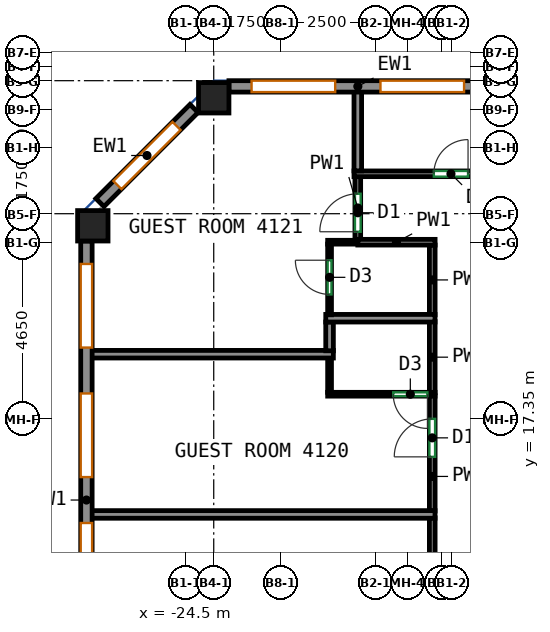
"""IFC4 building model, lengths in metres.
Left out: names, types, materials, properties, quantities, classifications, styles, units other than length and angle.
Written with IfcOpenShell. Run it as: python <this file> out.ifc"""

import sys

from ifc_helpers import new_model, si_unit, direction, frame, frame_2d, origin, origin_2d, place, context, subcontext, project, spatial, rectangle, extrude, source, transform, mapped, element, fill, save


model = new_model("IFC4")
c1 = context("Model", 3, precision=1e-05, world=origin(), true_north=direction((0.0, 1.0)))
c2 = subcontext(c1, "Body", "Model", "MODEL_VIEW")
j1 = project(units=[si_unit("LENGTHUNIT", "METRE"), si_unit("PLANEANGLEUNIT", "RADIAN")], contexts=[c1])
p1 = place(None, origin())
s1 = spatial("IfcSite", under=j1, at=p1, CompositionType="ELEMENT")
p2 = place(p1, origin())
s2 = spatial("IfcBuilding", under=s1, at=p2, CompositionType="ELEMENT")
p3 = place(p2, frame((0.0, 0.0, 175.3)))
s3 = spatial("IfcBuildingStorey", under=s2, at=p3, CompositionType="ELEMENT", Elevation=175.3)
m1 = source(origin(), c2, "Body", "SweptSolid", [
    extrude(rectangle(XDim=0.8, YDim=0.8, at=origin_2d()), origin(), (0.0, 0.0, 1.0), 3.12),
])
for number, where, z_axis, x_axis in (
    (1, (-26.932, 22.432, 0.0), (0.0, 0.0, 1.0), (1.0, 0.0, 0.0)),
    (2, (-23.75, 25.8, 0.0), (0.0, 0.0, 1.0), (1.0, 0.0, 0.0)),
):
    element("IfcColumn", number, at=place(p3, frame(where, z_axis=z_axis, x_axis=x_axis)), inside=s3, PredefinedType="COLUMN", context=c2, shape_type="MappedRepresentation", body=[
        mapped(m1, transform((0.0, 0.0, 0.0))),
    ])
m2 = source(origin(), c2, "Body", "SweptSolid", [
    extrude(rectangle(XDim=6.783, YDim=0.3, at=frame_2d((3.392, 0.0))), origin(), (0.0, 0.0, 1.0), 3.12),
])
p4 = place(p3, frame((-16.567, 26.1, 0.0), z_axis=(0.0, 0.0, 1.0), x_axis=(-1.0, 0.0, 0.0)))
e3 = element("IfcWall", 3, at=p4, inside=s3, PredefinedType="SOLIDWALL", context=c2, shape_type="MappedRepresentation", body=[
    mapped(m2, transform((0.0, 0.0, 0.0))),
])
p5 = place(p4, frame((0.596, 0.0, 0.85)))
e4 = element("IfcOpeningElement", 4, at=p5, cuts=e3, PredefinedType="OPENING", context=c2, shape_type="SweptSolid", body=[
    extrude(rectangle(XDim=2.2, YDim=1.95, at=frame_2d((1.1, 0.975))), frame((0.0, 0.16, 0.0), z_axis=(0.0, -1.0, 0.0), x_axis=(1.0, 0.0, 0.0)), (0.0, 0.0, 1.0), 0.32),
])
p6 = place(p4, frame((3.988, 0.0, 0.85)))
e5 = element("IfcOpeningElement", 5, at=p6, cuts=e3, PredefinedType="OPENING", context=c2, shape_type="SweptSolid", body=[
    extrude(rectangle(XDim=2.2, YDim=1.95, at=frame_2d((1.1, 0.975))), frame((0.0, 0.16, 0.0), z_axis=(0.0, -1.0, 0.0), x_axis=(1.0, 0.0, 0.0)), (0.0, 0.0, 1.0), 0.32),
])
m3 = source(origin(), c2, "Body", "SweptSolid", [
    extrude(rectangle(XDim=3.5, YDim=0.3, at=frame_2d((1.75, 0.0))), origin(), (0.0, 0.0, 1.0), 3.12),
])
p7 = place(p3, frame((-24.269, 25.519, 0.0), z_axis=(0.0, 0.0, 1.0), x_axis=(-0.707141656123, -0.70707190453, 0.0)))
e6 = element("IfcWall", 6, at=p7, inside=s3, PredefinedType="SOLIDWALL", context=c2, shape_type="MappedRepresentation", body=[
    mapped(m3, transform((0.0, 0.0, 0.0))),
])
p8 = place(p7, frame((0.65, 0.0, 0.85)))
e7 = element("IfcOpeningElement", 7, at=p8, cuts=e6, PredefinedType="OPENING", context=c2, shape_type="SweptSolid", body=[
    extrude(rectangle(XDim=2.2, YDim=1.95, at=frame_2d((1.1, 0.975))), frame((0.0, 0.16, 0.0), z_axis=(0.0, -1.0, 0.0), x_axis=(1.0, 0.0, 0.0)), (0.0, 0.0, 1.0), 0.32),
])
m4 = source(origin(), c2, "Body", "SweptSolid", [
    extrude(rectangle(XDim=13.632, YDim=0.3, at=frame_2d((6.816, 0.0))), origin(), (0.0, 0.0, 1.0), 3.12),
])
p9 = place(p3, frame((-27.1, 22.032, 0.0), z_axis=(0.0, 0.0, 1.0), x_axis=(0.0, -1.0, 0.0)))
e8 = element("IfcWall", 8, at=p9, inside=s3, PredefinedType="SOLIDWALL", context=c2, shape_type="MappedRepresentation", body=[
    mapped(m4, transform((0.0, 0.0, 0.0))),
])
p10 = place(p9, frame((0.604, 0.0, 0.85)))
e9 = element("IfcOpeningElement", 9, at=p10, cuts=e8, PredefinedType="OPENING", context=c2, shape_type="SweptSolid", body=[
    extrude(rectangle(XDim=2.2, YDim=1.95, at=frame_2d((1.1, 0.975))), frame((0.0, 0.16, 0.0), z_axis=(0.0, -1.0, 0.0), x_axis=(1.0, 0.0, 0.0)), (0.0, 0.0, 1.0), 0.32),
])
p11 = place(p9, frame((4.012, 0.0, 0.85)))
e10 = element("IfcOpeningElement", 10, at=p11, cuts=e8, PredefinedType="OPENING", context=c2, shape_type="SweptSolid", body=[
    extrude(rectangle(XDim=2.2, YDim=1.95, at=frame_2d((1.1, 0.975))), frame((0.0, 0.16, 0.0), z_axis=(0.0, -1.0, 0.0), x_axis=(1.0, 0.0, 0.0)), (0.0, 0.0, 1.0), 0.32),
])
p12 = place(p9, frame((7.42, 0.0, 0.85)))
e11 = element("IfcOpeningElement", 11, at=p12, cuts=e8, PredefinedType="OPENING", context=c2, shape_type="SweptSolid", body=[
    extrude(rectangle(XDim=2.2, YDim=1.95, at=frame_2d((1.1, 0.975))), frame((0.0, 0.16, 0.0), z_axis=(0.0, -1.0, 0.0), x_axis=(1.0, 0.0, 0.0)), (0.0, 0.0, 1.0), 0.32),
])
p13 = place(p9, frame((10.828, 0.0, 0.85)))
e12 = element("IfcOpeningElement", 12, at=p13, cuts=e8, PredefinedType="OPENING", context=c2, shape_type="SweptSolid", body=[
    extrude(rectangle(XDim=2.2, YDim=1.95, at=frame_2d((1.1, 0.975))), frame((0.0, 0.16, 0.0), z_axis=(0.0, -1.0, 0.0), x_axis=(1.0, 0.0, 0.0)), (0.0, 0.0, 1.0), 0.32),
])
p14 = place(p3, frame((-18.0, 10.04, 0.0), z_axis=(0.0, 0.0, 1.0), x_axis=(0.0, 1.0, 0.0)))
e13 = element("IfcWall", 13, at=p14, inside=s3, PredefinedType="PARTITIONING", context=c2, shape_type="SweptSolid", body=[
    extrude(rectangle(XDim=4.707, YDim=0.15, at=frame_2d((2.354, 0.0))), origin(), (0.0, 0.0, 1.0), 3.12),
])
p15 = place(p14, frame((0.501, 0.0, 0.0)))
e14 = element("IfcOpeningElement", 14, at=p15, cuts=e13, PredefinedType="OPENING", context=c2, shape_type="SweptSolid", body=[
    extrude(rectangle(XDim=1.0, YDim=2.1, at=frame_2d((0.5, 1.05))), frame((0.0, 0.085, 0.0), z_axis=(0.0, -1.0, 0.0), x_axis=(1.0, 0.0, 0.0)), (0.0, 0.0, 1.0), 0.17),
])
p16 = place(p3, frame((-18.0, 14.927, 0.0), z_axis=(0.0, 0.0, 1.0), x_axis=(0.0, 1.0, 0.0)))
e15 = element("IfcWall", 15, at=p16, inside=s3, PredefinedType="PARTITIONING", context=c2, shape_type="SweptSolid", body=[
    extrude(rectangle(XDim=3.033, YDim=0.15, at=frame_2d((1.517, 0.0))), origin(), (0.0, 0.0, 1.0), 3.12),
])
p17 = place(p16, frame((1.425, 0.0, 0.0)))
e16 = element("IfcOpeningElement", 16, at=p17, cuts=e15, PredefinedType="OPENING", context=c2, shape_type="SweptSolid", body=[
    extrude(rectangle(XDim=1.0, YDim=2.1, at=frame_2d((0.5, 1.05))), frame((0.0, 0.085, 0.0), z_axis=(0.0, -1.0, 0.0), x_axis=(1.0, 0.0, 0.0)), (0.0, 0.0, 1.0), 0.17),
])
p18 = place(p3, frame((-18.0, 18.04, 0.0), z_axis=(0.0, 0.0, 1.0), x_axis=(0.0, 1.0, 0.0)))
e17 = element("IfcWall", 17, at=p18, inside=s3, PredefinedType="PARTITIONING", context=c2, shape_type="SweptSolid", body=[
    extrude(rectangle(XDim=1.87, YDim=0.15, at=frame_2d((0.935, 0.0))), origin(), (0.0, 0.0, 1.0), 3.12),
])
p19 = place(p3, frame((-19.959, 22.075, 0.0), z_axis=(0.0, 0.0, 1.0), x_axis=(0.0, 1.0, 0.0)))
e18 = element("IfcWall", 18, at=p19, inside=s3, PredefinedType="PARTITIONING", context=c2, shape_type="SweptSolid", body=[
    extrude(rectangle(XDim=1.65, YDim=0.15, at=frame_2d((0.825, 0.0))), origin(), (0.0, 0.0, 1.0), 3.12),
])
p20 = place(p19, frame((0.2, 0.0, 0.0)))
e19 = element("IfcOpeningElement", 19, at=p20, cuts=e18, PredefinedType="OPENING", context=c2, shape_type="SweptSolid", body=[
    extrude(rectangle(XDim=1.0, YDim=2.1, at=frame_2d((0.5, 1.05))), frame((0.0, 0.085, 0.0), z_axis=(0.0, -1.0, 0.0), x_axis=(1.0, 0.0, 0.0)), (0.0, 0.0, 1.0), 0.17),
])
p21 = place(p3, frame((-18.0, 20.09, 0.0), z_axis=(0.0, 0.0, 1.0), x_axis=(0.0, 1.0, 0.0)))
e20 = element("IfcWall", 20, at=p21, inside=s3, PredefinedType="PARTITIONING", context=c2, shape_type="SweptSolid", body=[
    extrude(rectangle(XDim=1.835, YDim=0.15, at=frame_2d((0.917, 0.0))), origin(), (0.0, 0.0, 1.0), 3.12),
])
p22 = place(p3, frame((-19.959, 22.0, 0.0), z_axis=(0.0, 0.0, 1.0), x_axis=(1.0, 0.0, 0.0)))
e21 = element("IfcWall", 21, at=p22, inside=s3, PredefinedType="PARTITIONING", context=c2, shape_type="SweptSolid", body=[
    extrude(rectangle(XDim=2.034, YDim=0.15, at=frame_2d((1.017, 0.0))), origin(), (0.0, 0.0, 1.0), 3.12),
])
p23 = place(p3, frame((-20.059, 23.8, 0.0), z_axis=(0.0, 0.0, 1.0), x_axis=(1.0, 0.0, 0.0)))
e22 = element("IfcWall", 22, at=p23, inside=s3, PredefinedType="PARTITIONING", context=c2, shape_type="SweptSolid", body=[
    extrude(rectangle(XDim=41.909, YDim=0.15, at=frame_2d((20.955, 0.0))), origin(), (0.0, 0.0, 1.0), 3.12),
])
p24 = place(p23, frame((2.101, 0.0, 0.0)))
e23 = element("IfcOpeningElement", 23, at=p24, cuts=e22, PredefinedType="OPENING", context=c2, shape_type="SweptSolid", body=[
    extrude(rectangle(XDim=0.9, YDim=2.1, at=frame_2d((0.45, 1.05))), frame((0.0, 0.085, 0.0), z_axis=(0.0, -1.0, 0.0), x_axis=(1.0, 0.0, 0.0)), (0.0, 0.0, 1.0), 0.17),
])
p25 = place(p23, frame((4.585, 0.0, 0.0)))
e24 = element("IfcOpeningElement", 24, at=p25, cuts=e22, PredefinedType="OPENING", context=c2, shape_type="SweptSolid", body=[
    extrude(rectangle(XDim=1.0, YDim=2.1, at=frame_2d((0.5, 1.05))), frame((0.0, 0.085, 0.0), z_axis=(0.0, -1.0, 0.0), x_axis=(1.0, 0.0, 0.0)), (0.0, 0.0, 1.0), 0.17),
])
p26 = place(p23, frame((8.175, 0.0, 0.0)))
e25 = element("IfcOpeningElement", 25, at=p26, cuts=e22, PredefinedType="OPENING", context=c2, shape_type="SweptSolid", body=[
    extrude(rectangle(XDim=0.9, YDim=2.1, at=frame_2d((0.45, 1.05))), frame((0.0, 0.085, 0.0), z_axis=(0.0, -1.0, 0.0), x_axis=(1.0, 0.0, 0.0)), (0.0, 0.0, 1.0), 0.17),
])
p27 = place(p23, frame((13.173, 0.0, 0.0)))
e26 = element("IfcOpeningElement", 26, at=p27, cuts=e22, PredefinedType="OPENING", context=c2, shape_type="SweptSolid", body=[
    extrude(rectangle(XDim=1.0, YDim=2.1, at=frame_2d((0.5, 1.05))), frame((0.0, 0.085, 0.0), z_axis=(0.0, -1.0, 0.0), x_axis=(1.0, 0.0, 0.0)), (0.0, 0.0, 1.0), 0.17),
])
p28 = place(p23, frame((15.658, 0.0, 0.0)))
e27 = element("IfcOpeningElement", 27, at=p28, cuts=e22, PredefinedType="OPENING", context=c2, shape_type="SweptSolid", body=[
    extrude(rectangle(XDim=0.9, YDim=2.1, at=frame_2d((0.45, 1.05))), frame((0.0, 0.085, 0.0), z_axis=(0.0, -1.0, 0.0), x_axis=(1.0, 0.0, 0.0)), (0.0, 0.0, 1.0), 0.17),
])
p29 = place(p23, frame((21.315, 0.0, 0.0)))
e28 = element("IfcOpeningElement", 28, at=p29, cuts=e22, PredefinedType="OPENING", context=c2, shape_type="SweptSolid", body=[
    extrude(rectangle(XDim=0.9, YDim=2.1, at=frame_2d((0.45, 1.05))), frame((0.0, 0.085, 0.0), z_axis=(0.0, -1.0, 0.0), x_axis=(1.0, 0.0, 0.0)), (0.0, 0.0, 1.0), 0.17),
])
p30 = place(p23, frame((24.625, 0.0, 0.0)))
e29 = element("IfcOpeningElement", 29, at=p30, cuts=e22, PredefinedType="OPENING", context=c2, shape_type="SweptSolid", body=[
    extrude(rectangle(XDim=1.0, YDim=2.1, at=frame_2d((0.5, 1.05))), frame((0.0, 0.085, 0.0), z_axis=(0.0, -1.0, 0.0), x_axis=(1.0, 0.0, 0.0)), (0.0, 0.0, 1.0), 0.17),
])
p31 = place(p23, frame((29.043, 0.0, 0.0)))
e30 = element("IfcOpeningElement", 30, at=p31, cuts=e22, PredefinedType="OPENING", context=c2, shape_type="SweptSolid", body=[
    extrude(rectangle(XDim=0.9, YDim=2.1, at=frame_2d((0.45, 1.05))), frame((0.0, 0.085, 0.0), z_axis=(0.0, -1.0, 0.0), x_axis=(1.0, 0.0, 0.0)), (0.0, 0.0, 1.0), 0.17),
])
p32 = place(p23, frame((32.735, 0.0, 0.0)))
e31 = element("IfcOpeningElement", 31, at=p32, cuts=e22, PredefinedType="OPENING", context=c2, shape_type="SweptSolid", body=[
    extrude(rectangle(XDim=1.0, YDim=2.1, at=frame_2d((0.5, 1.05))), frame((0.0, 0.085, 0.0), z_axis=(0.0, -1.0, 0.0), x_axis=(1.0, 0.0, 0.0)), (0.0, 0.0, 1.0), 0.17),
])
p33 = place(p23, frame((36.627, 0.0, 0.0)))
e32 = element("IfcOpeningElement", 32, at=p33, cuts=e22, PredefinedType="OPENING", context=c2, shape_type="SweptSolid", body=[
    extrude(rectangle(XDim=0.9, YDim=2.1, at=frame_2d((0.45, 1.05))), frame((0.0, 0.085, 0.0), z_axis=(0.0, -1.0, 0.0), x_axis=(1.0, 0.0, 0.0)), (0.0, 0.0, 1.0), 0.17),
])
p34 = place(p23, frame((38.808, 0.0, 0.0)))
e33 = element("IfcOpeningElement", 33, at=p34, cuts=e22, PredefinedType="OPENING", context=c2, shape_type="SweptSolid", body=[
    extrude(rectangle(XDim=0.9, YDim=2.1, at=frame_2d((0.45, 1.05))), frame((0.0, 0.085, 0.0), z_axis=(0.0, -1.0, 0.0), x_axis=(1.0, 0.0, 0.0)), (0.0, 0.0, 1.0), 0.17),
])
p35 = place(p3, frame((-17.927, 14.837, 0.0), z_axis=(0.0, 0.0, 1.0), x_axis=(-1.0, 0.0, 0.0)))
e34 = element("IfcWall", 34, at=p35, inside=s3, PredefinedType="PARTITIONING", context=c2, shape_type="SweptSolid", body=[
    extrude(rectangle(XDim=9.073, YDim=0.2, at=frame_2d((4.537, 0.0))), origin(), (0.0, 0.0, 1.0), 3.12),
])
p36 = place(p3, frame((-17.927, 18.0, 0.0), z_axis=(0.0, 0.0, 1.0), x_axis=(-1.0, 0.0, 0.0)))
e35 = element("IfcWall", 35, at=p36, inside=s3, PredefinedType="PARTITIONING", context=c2, shape_type="SweptSolid", body=[
    extrude(rectangle(XDim=2.825, YDim=0.1, at=frame_2d((1.413, 0.0))), origin(), (0.0, 0.0, 1.0), 3.12),
])
p37 = place(p36, frame((0.2, 0.0, 0.0)))
e36 = element("IfcOpeningElement", 36, at=p37, cuts=e35, PredefinedType="OPENING", context=c2, shape_type="SweptSolid", body=[
    extrude(rectangle(XDim=0.9, YDim=2.1, at=frame_2d((0.45, 1.05))), frame((0.0, 0.06, 0.0), z_axis=(0.0, -1.0, 0.0), x_axis=(1.0, 0.0, 0.0)), (0.0, 0.0, 1.0), 0.12),
])
p38 = place(p3, frame((-20.702, 18.05, 0.0), z_axis=(0.0, 0.0, 1.0), x_axis=(0.0, 1.0, 0.0)))
e37 = element("IfcWall", 37, at=p38, inside=s3, PredefinedType="PARTITIONING", context=c2, shape_type="SweptSolid", body=[
    extrude(rectangle(XDim=0.903, YDim=0.1, at=frame_2d((0.451, 0.0))), origin(), (0.0, 0.0, 1.0), 3.12),
])
p39 = place(p3, frame((-20.602, 19.053, 0.0), z_axis=(0.0, 0.0, 1.0), x_axis=(-1.0, 0.0, 0.0)))
e38 = element("IfcWall", 38, at=p39, inside=s3, PredefinedType="PARTITIONING", context=c2, shape_type="SweptSolid", body=[
    extrude(rectangle(XDim=6.398, YDim=0.2, at=frame_2d((3.199, 0.0))), origin(), (0.0, 0.0, 1.0), 3.12),
])
p40 = place(p3, frame((-20.702, 19.9, 0.0), z_axis=(0.0, 0.0, 1.0), x_axis=(0.0, -1.0, 0.0)))
e39 = element("IfcWall", 39, at=p40, inside=s3, PredefinedType="PARTITIONING", context=c2, shape_type="SweptSolid", body=[
    extrude(rectangle(XDim=0.757, YDim=0.2, at=frame_2d((0.378, 0.0))), origin(), (0.0, 0.0, 1.0), 3.12),
])
p41 = place(p3, frame((-17.927, 20.0, 0.0), z_axis=(0.0, 0.0, 1.0), x_axis=(-1.0, 0.0, 0.0)))
e40 = element("IfcWall", 40, at=p41, inside=s3, PredefinedType="PARTITIONING", context=c2, shape_type="SweptSolid", body=[
    extrude(rectangle(XDim=2.875, YDim=0.2, at=frame_2d((1.438, 0.0))), origin(), (0.0, 0.0, 1.0), 3.12),
])
p42 = place(p3, frame((-20.752, 22.0, 0.0), z_axis=(0.0, 0.0, 1.0), x_axis=(1.0, 0.0, 0.0)))
e41 = element("IfcWall", 41, at=p42, inside=s3, PredefinedType="PARTITIONING", context=c2, shape_type="SweptSolid", body=[
    extrude(rectangle(XDim=0.791, YDim=0.1, at=frame_2d((0.396, 0.0))), origin(), (0.0, 0.0, 1.0), 3.12),
])
p43 = place(p3, frame((-20.702, 20.09, 0.0), z_axis=(0.0, 0.0, 1.0), x_axis=(0.0, 1.0, 0.0)))
e42 = element("IfcWall", 42, at=p43, inside=s3, PredefinedType="PARTITIONING", context=c2, shape_type="SweptSolid", body=[
    extrude(rectangle(XDim=1.86, YDim=0.1, at=frame_2d((0.93, 0.0))), origin(), (0.0, 0.0, 1.0), 3.12),
])
p44 = place(p43, frame((0.536, 0.0, 0.0)))
e43 = element("IfcOpeningElement", 43, at=p44, cuts=e42, PredefinedType="OPENING", context=c2, shape_type="SweptSolid", body=[
    extrude(rectangle(XDim=0.9, YDim=2.1, at=frame_2d((0.45, 1.05))), frame((0.0, 0.06, 0.0), z_axis=(0.0, -1.0, 0.0), x_axis=(1.0, 0.0, 0.0)), (0.0, 0.0, 1.0), 0.12),
])
p45 = place(p3, frame((-19.959, 23.877, 0.0), z_axis=(0.0, 0.0, 1.0), x_axis=(0.0, 1.0, 0.0)))
e44 = element("IfcWall", 44, at=p45, inside=s3, PredefinedType="PARTITIONING", context=c2, shape_type="SweptSolid", body=[
    extrude(rectangle(XDim=2.123, YDim=0.2, at=frame_2d((1.062, 0.0))), origin(), (0.0, 0.0, 1.0), 3.12),
])
p46 = place(p5, origin())
e45 = element("IfcWindow", 45, at=p46, inside=s3, PartitioningType="SINGLE_PANEL", PredefinedType="WINDOW", context=c2, shape_type="SweptSolid", body=[
    extrude(rectangle(XDim=2.2, YDim=1.95, at=frame_2d((1.1, 0.975))), frame((0.0, 0.03, 0.0), z_axis=(0.0, -1.0, 0.0), x_axis=(1.0, 0.0, 0.0)), (0.0, 0.0, 1.0), 0.06),
])
fill(e4, e45)
p47 = place(p6, origin())
e46 = element("IfcWindow", 46, at=p47, inside=s3, PartitioningType="SINGLE_PANEL", PredefinedType="WINDOW", context=c2, shape_type="SweptSolid", body=[
    extrude(rectangle(XDim=2.2, YDim=1.95, at=frame_2d((1.1, 0.975))), frame((0.0, 0.03, 0.0), z_axis=(0.0, -1.0, 0.0), x_axis=(1.0, 0.0, 0.0)), (0.0, 0.0, 1.0), 0.06),
])
fill(e5, e46)
p48 = place(p8, origin())
e47 = element("IfcWindow", 47, at=p48, inside=s3, PartitioningType="SINGLE_PANEL", PredefinedType="WINDOW", context=c2, shape_type="SweptSolid", body=[
    extrude(rectangle(XDim=2.2, YDim=1.95, at=frame_2d((1.1, 0.975))), frame((0.0, 0.03, 0.0), z_axis=(0.0, -1.0, 0.0), x_axis=(1.0, 0.0, 0.0)), (0.0, 0.0, 1.0), 0.06),
])
fill(e7, e47)
p49 = place(p10, origin())
e48 = element("IfcWindow", 48, at=p49, inside=s3, PartitioningType="SINGLE_PANEL", PredefinedType="WINDOW", context=c2, shape_type="SweptSolid", body=[
    extrude(rectangle(XDim=2.2, YDim=1.95, at=frame_2d((1.1, 0.975))), frame((0.0, 0.03, 0.0), z_axis=(0.0, -1.0, 0.0), x_axis=(1.0, 0.0, 0.0)), (0.0, 0.0, 1.0), 0.06),
])
fill(e9, e48)
p50 = place(p11, origin())
e49 = element("IfcWindow", 49, at=p50, inside=s3, PartitioningType="SINGLE_PANEL", PredefinedType="WINDOW", context=c2, shape_type="SweptSolid", body=[
    extrude(rectangle(XDim=2.2, YDim=1.95, at=frame_2d((1.1, 0.975))), frame((0.0, 0.03, 0.0), z_axis=(0.0, -1.0, 0.0), x_axis=(1.0, 0.0, 0.0)), (0.0, 0.0, 1.0), 0.06),
])
fill(e10, e49)
p51 = place(p12, origin())
e50 = element("IfcWindow", 50, at=p51, inside=s3, PartitioningType="SINGLE_PANEL", PredefinedType="WINDOW", context=c2, shape_type="SweptSolid", body=[
    extrude(rectangle(XDim=2.2, YDim=1.95, at=frame_2d((1.1, 0.975))), frame((0.0, 0.03, 0.0), z_axis=(0.0, -1.0, 0.0), x_axis=(1.0, 0.0, 0.0)), (0.0, 0.0, 1.0), 0.06),
])
fill(e11, e50)
p52 = place(p17, origin())
e51 = element("IfcDoor", 51, at=p52, inside=s3, OperationType="SINGLE_SWING_LEFT", PredefinedType="DOOR", context=c2, shape_type="SweptSolid", body=[
    extrude(rectangle(XDim=1.0, YDim=2.1, at=frame_2d((0.5, 1.05))), frame((0.0, 0.025, 0.0), z_axis=(0.0, -1.0, 0.0), x_axis=(1.0, 0.0, 0.0)), (0.0, 0.0, 1.0), 0.05),
])
fill(e16, e51)
p53 = place(p37, origin())
e52 = element("IfcDoor", 52, at=p53, inside=s3, OperationType="SINGLE_SWING_LEFT", PredefinedType="DOOR", context=c2, shape_type="SweptSolid", body=[
    extrude(rectangle(XDim=0.9, YDim=2.1, at=frame_2d((0.45, 1.05))), frame((0.0, 0.025, 0.0), z_axis=(0.0, -1.0, 0.0), x_axis=(1.0, 0.0, 0.0)), (0.0, 0.0, 1.0), 0.05),
])
fill(e36, e52)
p54 = place(p44, origin())
e53 = element("IfcDoor", 53, at=p54, inside=s3, OperationType="SINGLE_SWING_RIGHT", PredefinedType="DOOR", context=c2, shape_type="SweptSolid", body=[
    extrude(rectangle(XDim=0.9, YDim=2.1, at=frame_2d((0.45, 1.05))), frame((0.0, 0.025, 0.0), z_axis=(0.0, -1.0, 0.0), x_axis=(1.0, 0.0, 0.0)), (0.0, 0.0, 1.0), 0.05),
])
fill(e43, e53)
p55 = place(p20, origin())
e54 = element("IfcDoor", 54, at=p55, inside=s3, OperationType="SINGLE_SWING_LEFT", PredefinedType="DOOR", context=c2, shape_type="SweptSolid", body=[
    extrude(rectangle(XDim=1.0, YDim=2.1, at=frame_2d((0.5, 1.05))), frame((0.0, 0.025, 0.0), z_axis=(0.0, -1.0, 0.0), x_axis=(1.0, 0.0, 0.0)), (0.0, 0.0, 1.0), 0.05),
])
fill(e19, e54)
p56 = place(p24, origin())
e55 = element("IfcDoor", 55, at=p56, inside=s3, OperationType="SINGLE_SWING_RIGHT", PredefinedType="DOOR", context=c2, shape_type="SweptSolid", body=[
    extrude(rectangle(XDim=0.9, YDim=2.1, at=frame_2d((0.45, 1.05))), frame((0.0, 0.025, 0.0), z_axis=(0.0, -1.0, 0.0), x_axis=(1.0, 0.0, 0.0)), (0.0, 0.0, 1.0), 0.05),
])
fill(e23, e55)
save(model, sys.argv[1])
